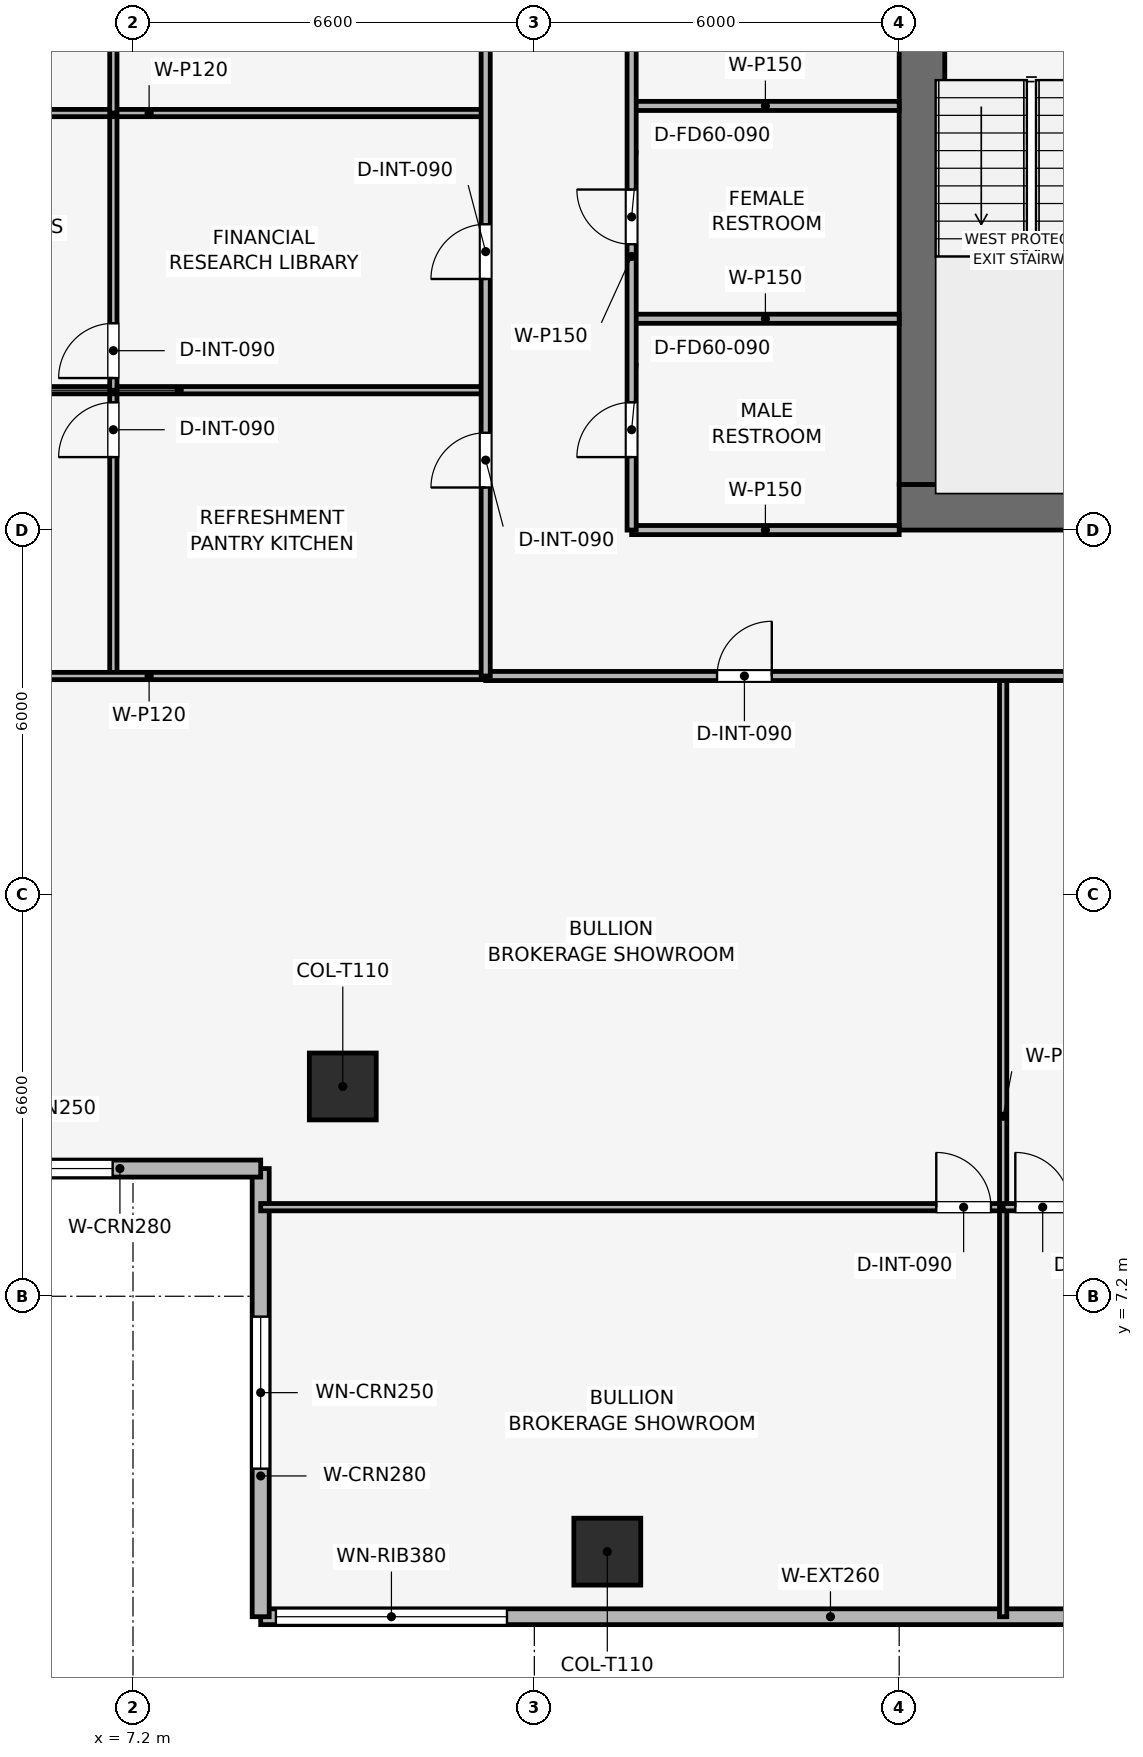
"""IFC4 building model, lengths in metres.
Left out: names, types, materials, properties, quantities, classifications, styles, units other than length and angle.
Written with IfcOpenShell. Run it as: python <this file> out.ifc"""

import sys

from ifc_helpers import new_model, si_unit, direction, frame, frame_2d, origin, origin_2d, place, context, subcontext, project, spatial, rectangle, extrude, element, fill, save


model = new_model("IFC4")
c1 = context("Model", 3, precision=1e-05, world=origin(), true_north=direction((0.0, 1.0)))
c2 = subcontext(c1, "Body", "Model", "MODEL_VIEW")
j1 = project(units=[si_unit("LENGTHUNIT", "METRE"), si_unit("PLANEANGLEUNIT", "RADIAN")], contexts=[c1])
p1 = place(None, origin())
s1 = spatial("IfcSite", under=j1, at=p1, CompositionType="ELEMENT")
p2 = place(p1, origin())
s2 = spatial("IfcBuilding", under=s1, at=p2, CompositionType="ELEMENT")
p3 = place(p2, frame((0.0, 0.0, 214.95)))
s3 = spatial("IfcBuildingStorey", under=s2, at=p3, CompositionType="ELEMENT", Elevation=214.95)
p4 = place(p3, frame((19.8, 20.175, 0.0), z_axis=(0.0, 0.0, 1.0), x_axis=(1.0, 0.0, 0.0)))
e1 = element("IfcWall", 1, at=p4, inside=s3, PredefinedType="SHEAR", context=c2, shape_type="SweptSolid", body=[
    extrude(rectangle(XDim=18.0, YDim=0.75, at=frame_2d((9.0, 0.0))), origin(), (0.0, 0.0, 1.0), 3.75),
])
p5 = place(p4, frame((8.4, 0.0, 0.0)))
e2 = element("IfcOpeningElement", 2, at=p5, cuts=e1, PredefinedType="OPENING", context=c2, shape_type="SweptSolid", body=[
    extrude(rectangle(XDim=1.2, YDim=2.2, at=frame_2d((0.6, 1.1))), frame((0.0, 0.385, 0.0), z_axis=(0.0, -1.0, 0.0), x_axis=(1.0, 0.0, 0.0)), (0.0, 0.0, 1.0), 0.77),
])
p6 = place(p3, frame((20.175, 20.55, 0.0), z_axis=(0.0, 0.0, 1.0), x_axis=(0.0, 1.0, 0.0)))
e3 = element("IfcWall", 3, at=p6, inside=s3, PredefinedType="SHEAR", context=c2, shape_type="SweptSolid", body=[
    extrude(rectangle(XDim=16.5, YDim=0.75, at=frame_2d((8.25, 0.0))), origin(), (0.0, 0.0, 1.0), 3.75),
])
p7 = place(p6, frame((10.25, 0.0, 0.0)))
e4 = element("IfcOpeningElement", 4, at=p7, cuts=e3, PredefinedType="OPENING", context=c2, shape_type="SweptSolid", body=[
    extrude(rectangle(XDim=1.1, YDim=2.15, at=frame_2d((0.55, 1.075))), frame((0.0, 0.385, 0.0), z_axis=(0.0, -1.0, 0.0), x_axis=(1.0, 0.0, 0.0)), (0.0, 0.0, 1.0), 0.77),
])
for number, where, z_axis, x_axis in (
    (5, (15.0, 3.0, 0.003), (0.0, 0.0, 1.0), (1.0, 0.0, 0.0)),
    (6, (10.65, 10.65, 0.003), (0.0, 0.0, 1.0), (1.0, 0.0, 0.0)),
):
    element("IfcColumn", number, at=place(p3, frame(where, z_axis=z_axis, x_axis=x_axis)), inside=s3, PredefinedType="COLUMN", context=c2, shape_type="SweptSolid", body=[
        extrude(rectangle(XDim=1.1, YDim=1.1, at=origin_2d()), origin(), (0.0, 0.0, 1.0), 3.494),
    ])
p8 = place(p3, frame((24.0, 1.93, 0.0), z_axis=(0.0, 0.0, 1.0), x_axis=(-1.0, 0.0, 0.0)))
e7 = element("IfcWall", 7, at=p8, inside=s3, PredefinedType="SOLIDWALL", context=c2, shape_type="SweptSolid", body=[
    extrude(rectangle(XDim=14.7, YDim=0.26, at=frame_2d((7.35, 0.0))), origin(), (0.0, 0.0, 1.0), 3.5),
])
p9 = place(p8, frame((10.65, 0.0, 0.9)))
e8 = element("IfcOpeningElement", 8, at=p9, cuts=e7, PredefinedType="OPENING", context=c2, shape_type="SweptSolid", body=[
    extrude(rectangle(XDim=3.8, YDim=1.9, at=frame_2d((1.9, 0.95))), frame((0.0, 0.14, 0.0), z_axis=(0.0, -1.0, 0.0), x_axis=(1.0, 0.0, 0.0)), (0.0, 0.0, 1.0), 0.28),
])
p10 = place(p3, frame((9.3, 1.93, 0.0), z_axis=(0.0, 0.0, 1.0), x_axis=(0.0, 1.0, 0.0)))
e9 = element("IfcWall", 9, at=p10, inside=s3, PredefinedType="SOLIDWALL", context=c2, shape_type="SweptSolid", body=[
    extrude(rectangle(XDim=7.37, YDim=0.28, at=frame_2d((3.685, 0.0))), origin(), (0.0, 0.0, 1.0), 3.5),
])
p11 = place(p10, frame((2.435, 0.0, 0.9)))
e10 = element("IfcOpeningElement", 10, at=p11, cuts=e9, PredefinedType="OPENING", context=c2, shape_type="SweptSolid", body=[
    extrude(rectangle(XDim=2.5, YDim=1.9, at=frame_2d((1.25, 0.95))), frame((0.0, 0.15, 0.0), z_axis=(0.0, -1.0, 0.0), x_axis=(1.0, 0.0, 0.0)), (0.0, 0.0, 1.0), 0.3),
])
p12 = place(p3, frame((9.3, 9.3, 0.0), z_axis=(0.0, 0.0, 1.0), x_axis=(-1.0, 0.0, 0.0)))
e11 = element("IfcWall", 11, at=p12, inside=s3, PredefinedType="SOLIDWALL", context=c2, shape_type="SweptSolid", body=[
    extrude(rectangle(XDim=7.37, YDim=0.28, at=frame_2d((3.685, 0.0))), origin(), (0.0, 0.0, 1.0), 3.5),
])
p13 = place(p12, frame((2.435, 0.0, 0.9)))
e12 = element("IfcOpeningElement", 12, at=p13, cuts=e11, PredefinedType="OPENING", context=c2, shape_type="SweptSolid", body=[
    extrude(rectangle(XDim=2.5, YDim=1.9, at=frame_2d((1.25, 0.95))), frame((0.0, 0.15, 0.0), z_axis=(0.0, -1.0, 0.0), x_axis=(1.0, 0.0, 0.0)), (0.0, 0.0, 1.0), 0.3),
])
p14 = place(p3, frame((15.4, 19.8, 0.0), z_axis=(0.0, 0.0, 1.0), x_axis=(1.0, 0.0, 0.0)))
e13 = element("IfcWall", 13, at=p14, inside=s3, PredefinedType="PARTITIONING", context=c2, shape_type="SweptSolid", body=[
    extrude(rectangle(XDim=4.4, YDim=0.15, at=frame_2d((2.2, 0.0))), origin(), (0.0, 0.0, 1.0), 3.035),
])
for number, where, z_axis, x_axis in (
    (14, (15.4, 23.275, 0.0), (0.0, 0.0, 1.0), (1.0, 0.0, 0.0)),
    (15, (15.4, 26.775, 0.0), (0.0, 0.0, 1.0), (1.0, 0.0, 0.0)),
):
    element("IfcWall", number, at=place(p3, frame(where, z_axis=z_axis, x_axis=x_axis)), inside=s3, PredefinedType="PARTITIONING", context=c2, shape_type="SweptSolid", body=[
        extrude(rectangle(XDim=4.4, YDim=0.15, at=frame_2d((2.2, 0.0))), origin(), (0.0, 0.0, 1.0), 3.5),
    ])
p15 = place(p3, frame((15.4, 19.8, 0.0), z_axis=(0.0, 0.0, 1.0), x_axis=(0.0, 1.0, 0.0)))
e16 = element("IfcWall", 16, at=p15, inside=s3, PredefinedType="PARTITIONING", context=c2, shape_type="SweptSolid", body=[
    extrude(rectangle(XDim=10.35, YDim=0.15, at=frame_2d((5.175, 0.0))), origin(), (0.0, 0.0, 1.0), 3.035),
])
p16 = place(p15, frame((1.2, 0.0, 0.0)))
e17 = element("IfcOpeningElement", 17, at=p16, cuts=e16, PredefinedType="OPENING", context=c2, shape_type="SweptSolid", body=[
    extrude(rectangle(XDim=0.9, YDim=2.1, at=frame_2d((0.45, 1.05))), frame((0.0, 0.085, 0.0), z_axis=(0.0, -1.0, 0.0), x_axis=(1.0, 0.0, 0.0)), (0.0, 0.0, 1.0), 0.17),
])
p17 = place(p15, frame((4.7, 0.0, 0.0)))
e18 = element("IfcOpeningElement", 18, at=p17, cuts=e16, PredefinedType="OPENING", context=c2, shape_type="SweptSolid", body=[
    extrude(rectangle(XDim=0.9, YDim=2.1, at=frame_2d((0.45, 1.05))), frame((0.0, 0.085, 0.0), z_axis=(0.0, -1.0, 0.0), x_axis=(1.0, 0.0, 0.0)), (0.0, 0.0, 1.0), 0.17),
])
p18 = place(p15, frame((8.1, 0.0, 0.0)))
e19 = element("IfcOpeningElement", 19, at=p18, cuts=e16, PredefinedType="OPENING", context=c2, shape_type="SweptSolid", body=[
    extrude(rectangle(XDim=0.95, YDim=2.1, at=frame_2d((0.475, 1.05))), frame((0.0, 0.085, 0.0), z_axis=(0.0, -1.0, 0.0), x_axis=(1.0, 0.0, 0.0)), (0.0, 0.0, 1.0), 0.17),
])
p19 = place(p3, frame((9.3, 8.665, 0.0), z_axis=(0.0, 0.0, 1.0), x_axis=(1.0, 0.0, 0.0)))
e20 = element("IfcWall", 20, at=p19, inside=s3, PredefinedType="PARTITIONING", context=c2, shape_type="SweptSolid", body=[
    extrude(rectangle(XDim=12.21, YDim=0.12, at=frame_2d((6.105, 0.0))), origin(), (0.0, 0.0, 1.0), 2.885),
])
p20 = place(p19, frame((11.11, 0.0, 0.0)))
e21 = element("IfcOpeningElement", 21, at=p20, cuts=e20, PredefinedType="OPENING", context=c2, shape_type="SweptSolid", body=[
    extrude(rectangle(XDim=0.9, YDim=2.1, at=frame_2d((0.45, 1.05))), frame((0.0, 0.07, 0.0), z_axis=(0.0, -1.0, 0.0), x_axis=(1.0, 0.0, 0.0)), (0.0, 0.0, 1.0), 0.14),
])
p21 = place(p3, frame((21.51, 1.93, 0.0), z_axis=(0.0, 0.0, 1.0), x_axis=(0.0, 1.0, 0.0)))
e22 = element("IfcWall", 22, at=p21, inside=s3, PredefinedType="PARTITIONING", context=c2, shape_type="SweptSolid", body=[
    extrude(rectangle(XDim=15.47, YDim=0.12, at=frame_2d((7.735, 0.0))), origin(), (0.0, 0.0, 1.0), 2.885),
])
p22 = place(p3, frame((21.51, 8.665, 0.0), z_axis=(0.0, 0.0, 1.0), x_axis=(1.0, 0.0, 0.0)))
e23 = element("IfcWall", 23, at=p22, inside=s3, PredefinedType="PARTITIONING", context=c2, shape_type="SweptSolid", body=[
    extrude(rectangle(XDim=26.79, YDim=0.12, at=frame_2d((13.395, 0.0))), origin(), (0.0, 0.0, 1.0), 2.885),
])
p23 = place(p22, frame((0.2, 0.0, 0.0)))
e24 = element("IfcOpeningElement", 24, at=p23, cuts=e23, PredefinedType="OPENING", context=c2, shape_type="SweptSolid", body=[
    extrude(rectangle(XDim=0.9, YDim=2.1, at=frame_2d((0.45, 1.05))), frame((0.0, 0.07, 0.0), z_axis=(0.0, -1.0, 0.0), x_axis=(1.0, 0.0, 0.0)), (0.0, 0.0, 1.0), 0.14),
])
p24 = place(p3, frame((6.877, 17.4, 0.0), z_axis=(0.0, 0.0, 1.0), x_axis=(0.0, 1.0, 0.0)))
e25 = element("IfcWall", 25, at=p24, inside=s3, PredefinedType="PARTITIONING", context=c2, shape_type="SweptSolid", body=[
    extrude(rectangle(XDim=4.7, YDim=0.12, at=frame_2d((2.35, 0.0))), origin(), (0.0, 0.0, 1.0), 3.035),
])
p25 = place(p24, frame((3.6, 0.0, 0.0)))
e26 = element("IfcOpeningElement", 26, at=p25, cuts=e25, PredefinedType="OPENING", context=c2, shape_type="SweptSolid", body=[
    extrude(rectangle(XDim=0.9, YDim=2.1, at=frame_2d((0.45, 1.05))), frame((0.0, 0.07, 0.0), z_axis=(0.0, -1.0, 0.0), x_axis=(1.0, 0.0, 0.0)), (0.0, 0.0, 1.0), 0.14),
])
p26 = place(p3, frame((1.93, 22.1, 0.0), z_axis=(0.0, 0.0, 1.0), x_axis=(1.0, 0.0, 0.0)))
e27 = element("IfcWall", 27, at=p26, inside=s3, PredefinedType="PARTITIONING", context=c2, shape_type="SweptSolid", body=[
    extrude(rectangle(XDim=11.07, YDim=0.12, at=frame_2d((5.535, 0.0))), origin(), (0.0, 0.0, 1.0), 2.885),
])
p27 = place(p3, frame((6.877, 22.1, 0.0), z_axis=(0.0, 0.0, 1.0), x_axis=(0.0, 1.0, 0.0)))
e28 = element("IfcWall", 28, at=p27, inside=s3, PredefinedType="PARTITIONING", context=c2, shape_type="SweptSolid", body=[
    extrude(rectangle(XDim=4.558, YDim=0.12, at=frame_2d((2.279, 0.0))), origin(), (0.0, 0.0, 1.0), 3.5),
])
p28 = place(p27, frame((0.2, 0.0, 0.0)))
e29 = element("IfcOpeningElement", 29, at=p28, cuts=e28, PredefinedType="OPENING", context=c2, shape_type="SweptSolid", body=[
    extrude(rectangle(XDim=0.9, YDim=2.1, at=frame_2d((0.45, 1.05))), frame((0.0, 0.07, 0.0), z_axis=(0.0, -1.0, 0.0), x_axis=(1.0, 0.0, 0.0)), (0.0, 0.0, 1.0), 0.14),
])
p29 = place(p3, frame((1.93, 26.658, 0.0), z_axis=(0.0, 0.0, 1.0), x_axis=(1.0, 0.0, 0.0)))
e30 = element("IfcWall", 30, at=p29, inside=s3, PredefinedType="PARTITIONING", context=c2, shape_type="SweptSolid", body=[
    extrude(rectangle(XDim=11.07, YDim=0.12, at=frame_2d((5.535, 0.0))), origin(), (0.0, 0.0, 1.0), 2.885),
])
p30 = place(p3, frame((6.877, 26.658, 0.0), z_axis=(0.0, 0.0, 1.0), x_axis=(0.0, 1.0, 0.0)))
e31 = element("IfcWall", 31, at=p30, inside=s3, PredefinedType="PARTITIONING", context=c2, shape_type="SweptSolid", body=[
    extrude(rectangle(XDim=4.297, YDim=0.12, at=frame_2d((2.148, 0.0))), origin(), (0.0, 0.0, 1.0), 3.035),
])
p31 = place(p30, frame((3.197, 0.0, 0.0)))
e32 = element("IfcOpeningElement", 32, at=p31, cuts=e31, PredefinedType="OPENING", context=c2, shape_type="SweptSolid", body=[
    extrude(rectangle(XDim=0.9, YDim=2.1, at=frame_2d((0.45, 1.05))), frame((0.0, 0.07, 0.0), z_axis=(0.0, -1.0, 0.0), x_axis=(1.0, 0.0, 0.0)), (0.0, 0.0, 1.0), 0.14),
])
p32 = place(p3, frame((1.93, 17.4, 0.0), z_axis=(0.0, 0.0, 1.0), x_axis=(1.0, 0.0, 0.0)))
e33 = element("IfcWall", 33, at=p32, inside=s3, PredefinedType="PARTITIONING", context=c2, shape_type="SweptSolid", body=[
    extrude(rectangle(XDim=11.07, YDim=0.12, at=frame_2d((5.535, 0.0))), origin(), (0.0, 0.0, 1.0), 2.885),
])
p33 = place(p3, frame((13.0, 17.4, 0.0), z_axis=(0.0, 0.0, 1.0), x_axis=(1.0, 0.0, 0.0)))
e34 = element("IfcWall", 34, at=p33, inside=s3, PredefinedType="PARTITIONING", context=c2, shape_type="SweptSolid", body=[
    extrude(rectangle(XDim=31.6, YDim=0.15, at=frame_2d((15.8, 0.0))), origin(), (0.0, 0.0, 1.0), 3.035),
])
p34 = place(p33, frame((3.805, 0.0, 0.0)))
e35 = element("IfcOpeningElement", 35, at=p34, cuts=e34, PredefinedType="OPENING", context=c2, shape_type="SweptSolid", body=[
    extrude(rectangle(XDim=0.9, YDim=2.1, at=frame_2d((0.45, 1.05))), frame((0.0, 0.085, 0.0), z_axis=(0.0, -1.0, 0.0), x_axis=(1.0, 0.0, 0.0)), (0.0, 0.0, 1.0), 0.17),
])
p35 = place(p33, frame((19.605, 0.0, 0.0)))
e36 = element("IfcOpeningElement", 36, at=p35, cuts=e34, PredefinedType="OPENING", context=c2, shape_type="SweptSolid", body=[
    extrude(rectangle(XDim=0.9, YDim=2.1, at=frame_2d((0.45, 1.05))), frame((0.0, 0.085, 0.0), z_axis=(0.0, -1.0, 0.0), x_axis=(1.0, 0.0, 0.0)), (0.0, 0.0, 1.0), 0.17),
])
p36 = place(p3, frame((13.0, 17.4, 0.0), z_axis=(0.0, 0.0, 1.0), x_axis=(0.0, 1.0, 0.0)))
e37 = element("IfcWall", 37, at=p36, inside=s3, PredefinedType="PARTITIONING", context=c2, shape_type="SweptSolid", body=[
    extrude(rectangle(XDim=22.8, YDim=0.15, at=frame_2d((11.4, 0.0))), origin(), (0.0, 0.0, 1.0), 3.035),
])
p37 = place(p36, frame((3.1, 0.0, 0.0)))
e38 = element("IfcOpeningElement", 38, at=p37, cuts=e37, PredefinedType="OPENING", context=c2, shape_type="SweptSolid", body=[
    extrude(rectangle(XDim=0.9, YDim=2.1, at=frame_2d((0.45, 1.05))), frame((0.0, 0.085, 0.0), z_axis=(0.0, -1.0, 0.0), x_axis=(1.0, 0.0, 0.0)), (0.0, 0.0, 1.0), 0.17),
])
p38 = place(p36, frame((6.529, 0.0, 0.0)))
e39 = element("IfcOpeningElement", 39, at=p38, cuts=e37, PredefinedType="OPENING", context=c2, shape_type="SweptSolid", body=[
    extrude(rectangle(XDim=0.9, YDim=2.1, at=frame_2d((0.45, 1.05))), frame((0.0, 0.085, 0.0), z_axis=(0.0, -1.0, 0.0), x_axis=(1.0, 0.0, 0.0)), (0.0, 0.0, 1.0), 0.17),
])
p39 = place(p36, frame((10.957, 0.0, 0.0)))
e40 = element("IfcOpeningElement", 40, at=p39, cuts=e37, PredefinedType="OPENING", context=c2, shape_type="SweptSolid", body=[
    extrude(rectangle(XDim=0.9, YDim=2.1, at=frame_2d((0.45, 1.05))), frame((0.0, 0.085, 0.0), z_axis=(0.0, -1.0, 0.0), x_axis=(1.0, 0.0, 0.0)), (0.0, 0.0, 1.0), 0.17),
])
p40 = place(p36, frame((16.527, 0.0, 0.0)))
e41 = element("IfcOpeningElement", 41, at=p40, cuts=e37, PredefinedType="OPENING", context=c2, shape_type="SweptSolid", body=[
    extrude(rectangle(XDim=0.9, YDim=2.1, at=frame_2d((0.45, 1.05))), frame((0.0, 0.085, 0.0), z_axis=(0.0, -1.0, 0.0), x_axis=(1.0, 0.0, 0.0)), (0.0, 0.0, 1.0), 0.17),
])
p41 = place(p9, origin())
e42 = element("IfcWindow", 42, at=p41, inside=s3, PartitioningType="SINGLE_PANEL", PredefinedType="WINDOW", context=c2, shape_type="SweptSolid", body=[
    extrude(rectangle(XDim=3.8, YDim=1.9, at=frame_2d((1.9, 0.95))), frame((0.0, 0.03, 0.0), z_axis=(0.0, -1.0, 0.0), x_axis=(1.0, 0.0, 0.0)), (0.0, 0.0, 1.0), 0.06),
])
fill(e8, e42)
p42 = place(p11, origin())
e43 = element("IfcWindow", 43, at=p42, inside=s3, PartitioningType="SINGLE_PANEL", PredefinedType="WINDOW", context=c2, shape_type="SweptSolid", body=[
    extrude(rectangle(XDim=2.5, YDim=1.9, at=frame_2d((1.25, 0.95))), frame((0.0, 0.03, 0.0), z_axis=(0.0, -1.0, 0.0), x_axis=(1.0, 0.0, 0.0)), (0.0, 0.0, 1.0), 0.06),
])
fill(e10, e43)
p43 = place(p13, origin())
e44 = element("IfcWindow", 44, at=p43, inside=s3, PartitioningType="SINGLE_PANEL", PredefinedType="WINDOW", context=c2, shape_type="SweptSolid", body=[
    extrude(rectangle(XDim=2.5, YDim=1.9, at=frame_2d((1.25, 0.95))), frame((0.0, 0.03, 0.0), z_axis=(0.0, -1.0, 0.0), x_axis=(1.0, 0.0, 0.0)), (0.0, 0.0, 1.0), 0.06),
])
fill(e12, e44)
p44 = place(p16, origin())
e45 = element("IfcDoor", 45, at=p44, inside=s3, OperationType="SINGLE_SWING_LEFT", PredefinedType="DOOR", context=c2, shape_type="SweptSolid", body=[
    extrude(rectangle(XDim=0.9, YDim=2.1, at=frame_2d((0.45, 1.05))), frame((0.0, 0.025, 0.0), z_axis=(0.0, -1.0, 0.0), x_axis=(1.0, 0.0, 0.0)), (0.0, 0.0, 1.0), 0.05),
])
fill(e17, e45)
p45 = place(p17, origin())
e46 = element("IfcDoor", 46, at=p45, inside=s3, OperationType="SINGLE_SWING_RIGHT", PredefinedType="DOOR", context=c2, shape_type="SweptSolid", body=[
    extrude(rectangle(XDim=0.9, YDim=2.1, at=frame_2d((0.45, 1.05))), frame((0.0, 0.025, 0.0), z_axis=(0.0, -1.0, 0.0), x_axis=(1.0, 0.0, 0.0)), (0.0, 0.0, 1.0), 0.05),
])
fill(e18, e46)
p46 = place(p20, origin())
e47 = element("IfcDoor", 47, at=p46, inside=s3, OperationType="SINGLE_SWING_LEFT", PredefinedType="DOOR", context=c2, shape_type="SweptSolid", body=[
    extrude(rectangle(XDim=0.9, YDim=2.1, at=frame_2d((0.45, 1.05))), frame((0.0, 0.025, 0.0), z_axis=(0.0, -1.0, 0.0), x_axis=(1.0, 0.0, 0.0)), (0.0, 0.0, 1.0), 0.05),
])
fill(e21, e47)
p47 = place(p23, origin())
e48 = element("IfcDoor", 48, at=p47, inside=s3, OperationType="SINGLE_SWING_LEFT", PredefinedType="DOOR", context=c2, shape_type="SweptSolid", body=[
    extrude(rectangle(XDim=0.9, YDim=2.1, at=frame_2d((0.45, 1.05))), frame((0.0, 0.025, 0.0), z_axis=(0.0, -1.0, 0.0), x_axis=(1.0, 0.0, 0.0)), (0.0, 0.0, 1.0), 0.05),
])
fill(e24, e48)
p48 = place(p25, origin())
e49 = element("IfcDoor", 49, at=p48, inside=s3, OperationType="SINGLE_SWING_LEFT", PredefinedType="DOOR", context=c2, shape_type="SweptSolid", body=[
    extrude(rectangle(XDim=0.9, YDim=2.1, at=frame_2d((0.45, 1.05))), frame((0.0, 0.025, 0.0), z_axis=(0.0, -1.0, 0.0), x_axis=(1.0, 0.0, 0.0)), (0.0, 0.0, 1.0), 0.05),
])
fill(e26, e49)
p49 = place(p28, origin())
e50 = element("IfcDoor", 50, at=p49, inside=s3, OperationType="SINGLE_SWING_LEFT", PredefinedType="DOOR", context=c2, shape_type="SweptSolid", body=[
    extrude(rectangle(XDim=0.9, YDim=2.1, at=frame_2d((0.45, 1.05))), frame((0.0, 0.025, 0.0), z_axis=(0.0, -1.0, 0.0), x_axis=(1.0, 0.0, 0.0)), (0.0, 0.0, 1.0), 0.05),
])
fill(e29, e50)
p50 = place(p34, origin())
e51 = element("IfcDoor", 51, at=p50, inside=s3, OperationType="SINGLE_SWING_RIGHT", PredefinedType="DOOR", context=c2, shape_type="SweptSolid", body=[
    extrude(rectangle(XDim=0.9, YDim=2.1, at=frame_2d((0.45, 1.05))), frame((0.0, 0.025, 0.0), z_axis=(0.0, -1.0, 0.0), x_axis=(1.0, 0.0, 0.0)), (0.0, 0.0, 1.0), 0.05),
])
fill(e35, e51)
p51 = place(p37, origin())
e52 = element("IfcDoor", 52, at=p51, inside=s3, OperationType="SINGLE_SWING_LEFT", PredefinedType="DOOR", context=c2, shape_type="SweptSolid", body=[
    extrude(rectangle(XDim=0.9, YDim=2.1, at=frame_2d((0.45, 1.05))), frame((0.0, 0.025, 0.0), z_axis=(0.0, -1.0, 0.0), x_axis=(1.0, 0.0, 0.0)), (0.0, 0.0, 1.0), 0.05),
])
fill(e38, e52)
p52 = place(p38, origin())
e53 = element("IfcDoor", 53, at=p52, inside=s3, OperationType="SINGLE_SWING_LEFT", PredefinedType="DOOR", context=c2, shape_type="SweptSolid", body=[
    extrude(rectangle(XDim=0.9, YDim=2.1, at=frame_2d((0.45, 1.05))), frame((0.0, 0.025, 0.0), z_axis=(0.0, -1.0, 0.0), x_axis=(1.0, 0.0, 0.0)), (0.0, 0.0, 1.0), 0.05),
])
fill(e39, e53)
save(model, sys.argv[1])
